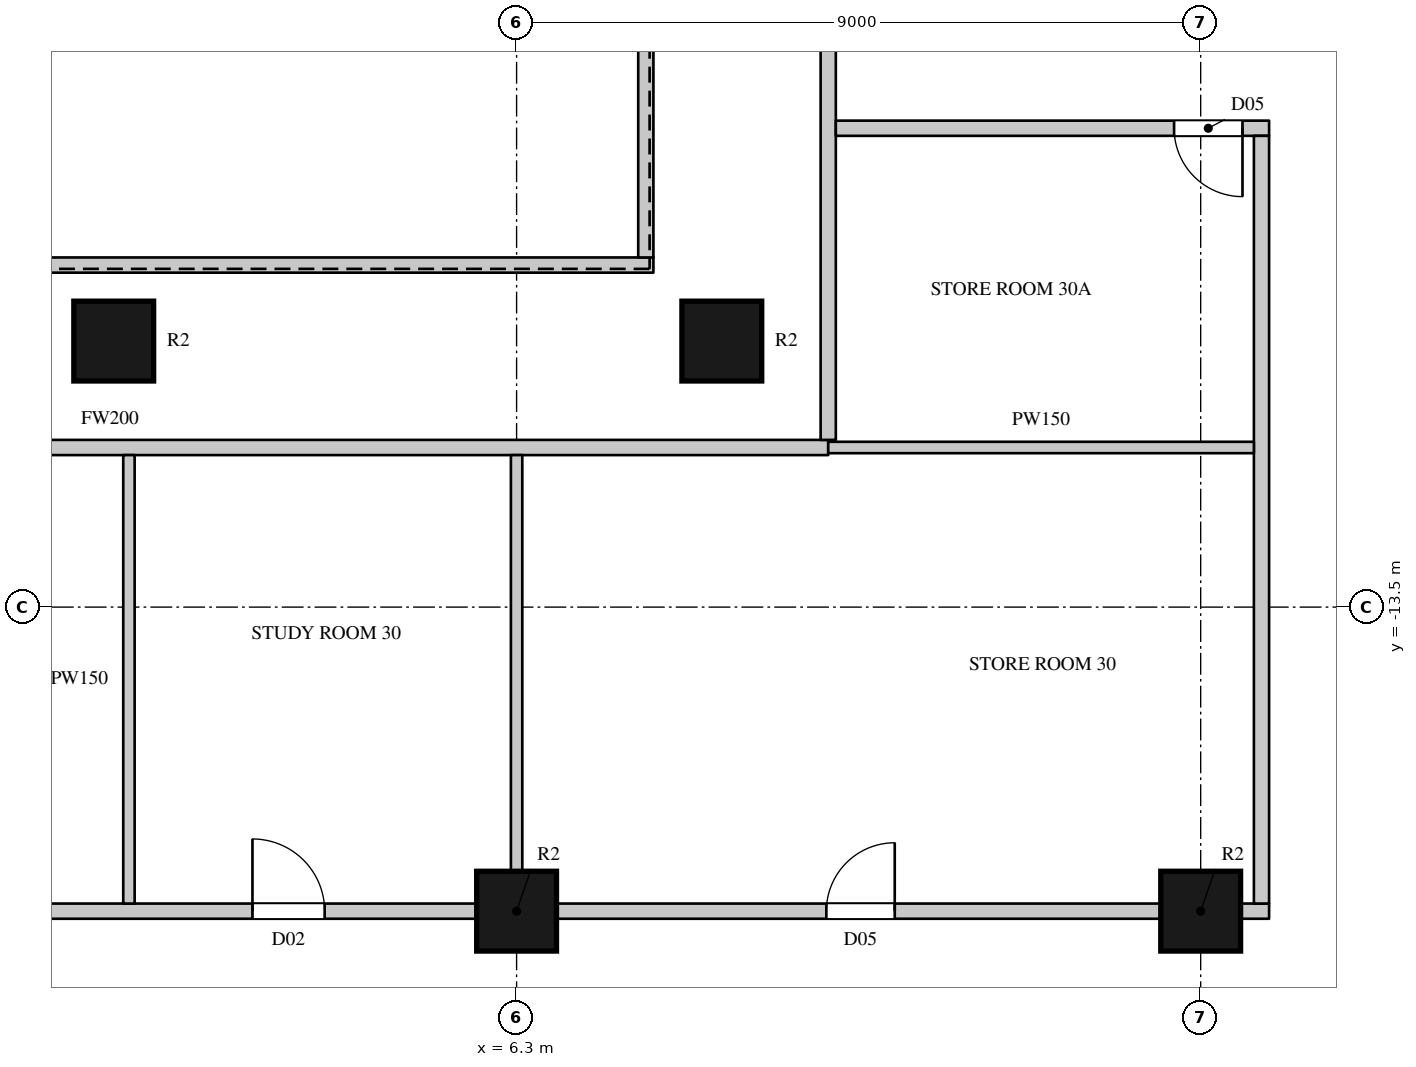
"""IFC4 building model, lengths in metres.
Left out: names, types, materials, properties, quantities, classifications, styles, units other than length and angle.
Written with IfcOpenShell. Run it as: python <this file> out.ifc"""

import sys

from ifc_helpers import new_model, si_unit, direction, frame, frame_2d, origin, origin_2d, place, context, subcontext, project, spatial, rectangle, circle, extrude, element, fill, save


model = new_model("IFC4")
c1 = context("Model", 3, precision=1e-05, world=origin(), true_north=direction((0.0, 1.0)))
c2 = subcontext(c1, "Body", "Model", "MODEL_VIEW")
j1 = project(units=[si_unit("LENGTHUNIT", "METRE"), si_unit("PLANEANGLEUNIT", "RADIAN")], contexts=[c1])
p1 = place(None, origin())
s1 = spatial("IfcSite", under=j1, at=p1, CompositionType="ELEMENT")
p2 = place(p1, origin())
s2 = spatial("IfcBuilding", under=s1, at=p2, CompositionType="ELEMENT")
p3 = place(p2, frame((0.0, 0.0, 138.3)))
s3 = spatial("IfcBuildingStorey", under=s2, at=p3, CompositionType="ELEMENT", Elevation=138.3)
for number, where, z_axis, x_axis in (
    (1, (6.3, -17.5, 0.0), (0.0, 0.0, 1.0), (1.0, 0.0, 0.0)),
    (2, (15.3, -17.5, 0.0), (0.0, 0.0, 1.0), (1.0, 0.0, 0.0)),
    (3, (1.0, -10.0, 0.0), (0.0, 0.0, 1.0), (1.0, 0.0, 0.0)),
    (4, (9.0, -10.0, 0.0), (0.0, 0.0, 1.0), (1.0, 0.0, 0.0)),
):
    element("IfcColumn", number, at=place(p3, frame(where, z_axis=z_axis, x_axis=x_axis)), inside=s3, PredefinedType="COLUMN", context=c2, shape_type="SweptSolid", body=[
        extrude(circle(Radius=0.525, at=origin_2d()), origin(), (0.0, 0.0, 1.0), 3.6),
    ])
p4 = place(p3, frame((-8.5, -11.4, 0.0), z_axis=(0.0, 0.0, 1.0), x_axis=(1.0, 0.0, 0.0)))
e5 = element("IfcWall", 5, at=p4, inside=s3, PredefinedType="PARTITIONING", context=c2, shape_type="SweptSolid", body=[
    extrude(rectangle(XDim=18.9, YDim=0.2, at=frame_2d((9.45, 0.0))), origin(), (0.0, 0.0, 1.0), 3.3),
])
p5 = place(p3, frame((-2.175, -17.5, 0.0), z_axis=(0.0, 0.0, 1.0), x_axis=(1.0, 0.0, 0.0)))
e6 = element("IfcWall", 6, at=p5, inside=s3, PredefinedType="PARTITIONING", context=c2, shape_type="SweptSolid", body=[
    extrude(rectangle(XDim=7.95, YDim=0.2, at=frame_2d((3.975, 0.0))), origin(), (0.0, 0.0, 1.0), 2.75),
])
p6 = place(p5, frame((5.0, 0.0, 0.0)))
e7 = element("IfcOpeningElement", 7, at=p6, cuts=e6, PredefinedType="OPENING", context=c2, shape_type="SweptSolid", body=[
    extrude(rectangle(XDim=0.95, YDim=2.2, at=frame_2d((0.475, 1.1))), frame((0.0, 0.11, 0.0), z_axis=(0.0, -1.0, 0.0), x_axis=(1.0, 0.0, 0.0)), (0.0, 0.0, 1.0), 0.22),
])
p7 = place(p3, frame((6.825, -17.5, 0.0), z_axis=(0.0, 0.0, 1.0), x_axis=(1.0, 0.0, 0.0)))
e8 = element("IfcWall", 8, at=p7, inside=s3, PredefinedType="PARTITIONING", context=c2, shape_type="SweptSolid", body=[
    extrude(rectangle(XDim=7.95, YDim=0.2, at=frame_2d((3.975, 0.0))), origin(), (0.0, 0.0, 1.0), 2.75),
])
p8 = place(p7, frame((3.55, 0.0, 0.0)))
e9 = element("IfcOpeningElement", 9, at=p8, cuts=e8, PredefinedType="OPENING", context=c2, shape_type="SweptSolid", body=[
    extrude(rectangle(XDim=0.9, YDim=2.2, at=frame_2d((0.45, 1.1))), frame((0.0, 0.11, 0.0), z_axis=(0.0, -1.0, 0.0), x_axis=(1.0, 0.0, 0.0)), (0.0, 0.0, 1.0), 0.22),
])
p9 = place(p3, frame((15.825, -17.5, 0.0), z_axis=(0.0, 0.0, 1.0), x_axis=(1.0, 0.0, 0.0)))
e10 = element("IfcWall", 10, at=p9, inside=s3, PredefinedType="PARTITIONING", context=c2, shape_type="SweptSolid", body=[
    extrude(rectangle(XDim=0.375, YDim=0.2, at=frame_2d((0.188, 0.0))), origin(), (0.0, 0.0, 1.0), 3.3),
])
p10 = place(p3, frame((-6.1, -9.0, 0.0), z_axis=(0.0, 0.0, 1.0), x_axis=(1.0, 0.0, 0.0)))
e11 = element("IfcWall", 11, at=p10, inside=s3, PredefinedType="PARTITIONING", context=c2, shape_type="SweptSolid", body=[
    extrude(rectangle(XDim=14.2, YDim=0.2, at=frame_2d((7.1, 0.0))), origin(), (0.0, 0.0, 1.0), 3.3),
])
p11 = place(p3, frame((8.0, -8.9, 0.0), z_axis=(0.0, 0.0, 1.0), x_axis=(0.0, 1.0, 0.0)))
e12 = element("IfcWall", 12, at=p11, inside=s3, PredefinedType="PARTITIONING", context=c2, shape_type="SweptSolid", body=[
    extrude(rectangle(XDim=17.8, YDim=0.2, at=frame_2d((8.9, 0.0))), origin(), (0.0, 0.0, 1.0), 3.3),
])
p12 = place(p3, frame((10.4, -11.3, 0.0), z_axis=(0.0, 0.0, 1.0), x_axis=(0.0, 1.0, 0.0)))
e13 = element("IfcWall", 13, at=p12, inside=s3, PredefinedType="PARTITIONING", context=c2, shape_type="SweptSolid", body=[
    extrude(rectangle(XDim=18.045, YDim=0.2, at=frame_2d((9.022, 0.0))), origin(), (0.0, 0.0, 1.0), 3.3),
])
p13 = place(p12, frame((16.3, 0.0, 0.0)))
e14 = element("IfcOpeningElement", 14, at=p13, cuts=e13, PredefinedType="OPENING", context=c2, shape_type="SweptSolid", body=[
    extrude(rectangle(XDim=1.5, YDim=2.2, at=frame_2d((0.75, 1.1))), frame((0.0, 0.11, 0.0), z_axis=(0.0, -1.0, 0.0), x_axis=(1.0, 0.0, 0.0)), (0.0, 0.0, 1.0), 0.22),
])
p14 = place(p12, frame((14.65, 0.0, 0.0)))
e15 = element("IfcOpeningElement", 15, at=p14, cuts=e13, PredefinedType="OPENING", context=c2, shape_type="SweptSolid", body=[
    extrude(rectangle(XDim=1.5, YDim=2.2, at=frame_2d((0.75, 1.1))), frame((0.0, 0.11, 0.0), z_axis=(0.0, -1.0, 0.0), x_axis=(1.0, 0.0, 0.0)), (0.0, 0.0, 1.0), 0.22),
])
p15 = place(p12, frame((9.1, 0.0, 0.0)))
e16 = element("IfcOpeningElement", 16, at=p15, cuts=e13, PredefinedType="OPENING", context=c2, shape_type="SweptSolid", body=[
    extrude(rectangle(XDim=1.5, YDim=2.2, at=frame_2d((0.75, 1.1))), frame((0.0, 0.11, 0.0), z_axis=(0.0, -1.0, 0.0), x_axis=(1.0, 0.0, 0.0)), (0.0, 0.0, 1.0), 0.22),
])
p16 = place(p3, frame((10.5, -7.2, 0.0), z_axis=(0.0, 0.0, 1.0), x_axis=(1.0, 0.0, 0.0)))
e17 = element("IfcWall", 17, at=p16, inside=s3, PredefinedType="PARTITIONING", context=c2, shape_type="SweptSolid", body=[
    extrude(rectangle(XDim=5.7, YDim=0.2, at=frame_2d((2.85, 0.0))), origin(), (0.0, 0.0, 1.0), 3.3),
])
p17 = place(p16, frame((4.45, 0.0, 0.0)))
e18 = element("IfcOpeningElement", 18, at=p17, cuts=e17, PredefinedType="OPENING", context=c2, shape_type="SweptSolid", body=[
    extrude(rectangle(XDim=0.9, YDim=2.2, at=frame_2d((0.45, 1.1))), frame((0.0, 0.11, 0.0), z_axis=(0.0, -1.0, 0.0), x_axis=(1.0, 0.0, 0.0)), (0.0, 0.0, 1.0), 0.22),
])
p18 = place(p3, frame((16.1, -17.4, 0.0), z_axis=(0.0, 0.0, 1.0), x_axis=(0.0, 1.0, 0.0)))
e19 = element("IfcWall", 19, at=p18, inside=s3, PredefinedType="PARTITIONING", context=c2, shape_type="SweptSolid", body=[
    extrude(rectangle(XDim=10.1, YDim=0.2, at=frame_2d((5.05, 0.0))), origin(), (0.0, 0.0, 1.0), 3.3),
])
p19 = place(p3, frame((1.2, -17.4, 0.0), z_axis=(0.0, 0.0, 1.0), x_axis=(0.0, 1.0, 0.0)))
e20 = element("IfcWall", 20, at=p19, inside=s3, PredefinedType="PARTITIONING", context=c2, shape_type="SweptSolid", body=[
    extrude(rectangle(XDim=5.9, YDim=0.15, at=frame_2d((2.95, 0.0))), origin(), (0.0, 0.0, 1.0), 3.3),
])
p20 = place(p3, frame((6.3, -16.975, 0.0), z_axis=(0.0, 0.0, 1.0), x_axis=(0.0, 1.0, 0.0)))
e21 = element("IfcWall", 21, at=p20, inside=s3, PredefinedType="PARTITIONING", context=c2, shape_type="SweptSolid", body=[
    extrude(rectangle(XDim=5.475, YDim=0.15, at=frame_2d((2.738, 0.0))), origin(), (0.0, 0.0, 1.0), 2.75),
])
p21 = place(p3, frame((10.4, -11.4, 0.0), z_axis=(0.0, 0.0, 1.0), x_axis=(1.0, 0.0, 0.0)))
e22 = element("IfcWall", 22, at=p21, inside=s3, PredefinedType="PARTITIONING", context=c2, shape_type="SweptSolid", body=[
    extrude(rectangle(XDim=5.6, YDim=0.15, at=frame_2d((2.8, 0.0))), origin(), (0.0, 0.0, 1.0), 3.3),
])
p22 = place(p6, origin())
e23 = element("IfcDoor", 23, at=p22, inside=s3, OperationType="SINGLE_SWING_LEFT", PredefinedType="DOOR", context=c2, shape_type="SweptSolid", body=[
    extrude(rectangle(XDim=0.95, YDim=2.2, at=frame_2d((0.475, 1.1))), frame((0.0, 0.025, 0.0), z_axis=(0.0, -1.0, 0.0), x_axis=(1.0, 0.0, 0.0)), (0.0, 0.0, 1.0), 0.05),
])
fill(e7, e23)
p23 = place(p8, origin())
e24 = element("IfcDoor", 24, at=p23, inside=s3, OperationType="SINGLE_SWING_RIGHT", PredefinedType="DOOR", context=c2, shape_type="SweptSolid", body=[
    extrude(rectangle(XDim=0.9, YDim=2.2, at=frame_2d((0.45, 1.1))), frame((0.0, 0.025, 0.0), z_axis=(0.0, -1.0, 0.0), x_axis=(1.0, 0.0, 0.0)), (0.0, 0.0, 1.0), 0.05),
])
fill(e9, e24)
p24 = place(p17, origin())
e25 = element("IfcDoor", 25, at=p24, inside=s3, OperationType="SINGLE_SWING_LEFT", PredefinedType="DOOR", context=c2, shape_type="SweptSolid", body=[
    extrude(rectangle(XDim=0.9, YDim=2.2, at=frame_2d((0.45, 1.1))), frame((0.0, 0.025, 0.0), z_axis=(0.0, -1.0, 0.0), x_axis=(1.0, 0.0, 0.0)), (0.0, 0.0, 1.0), 0.05),
])
fill(e18, e25)
save(model, sys.argv[1])
